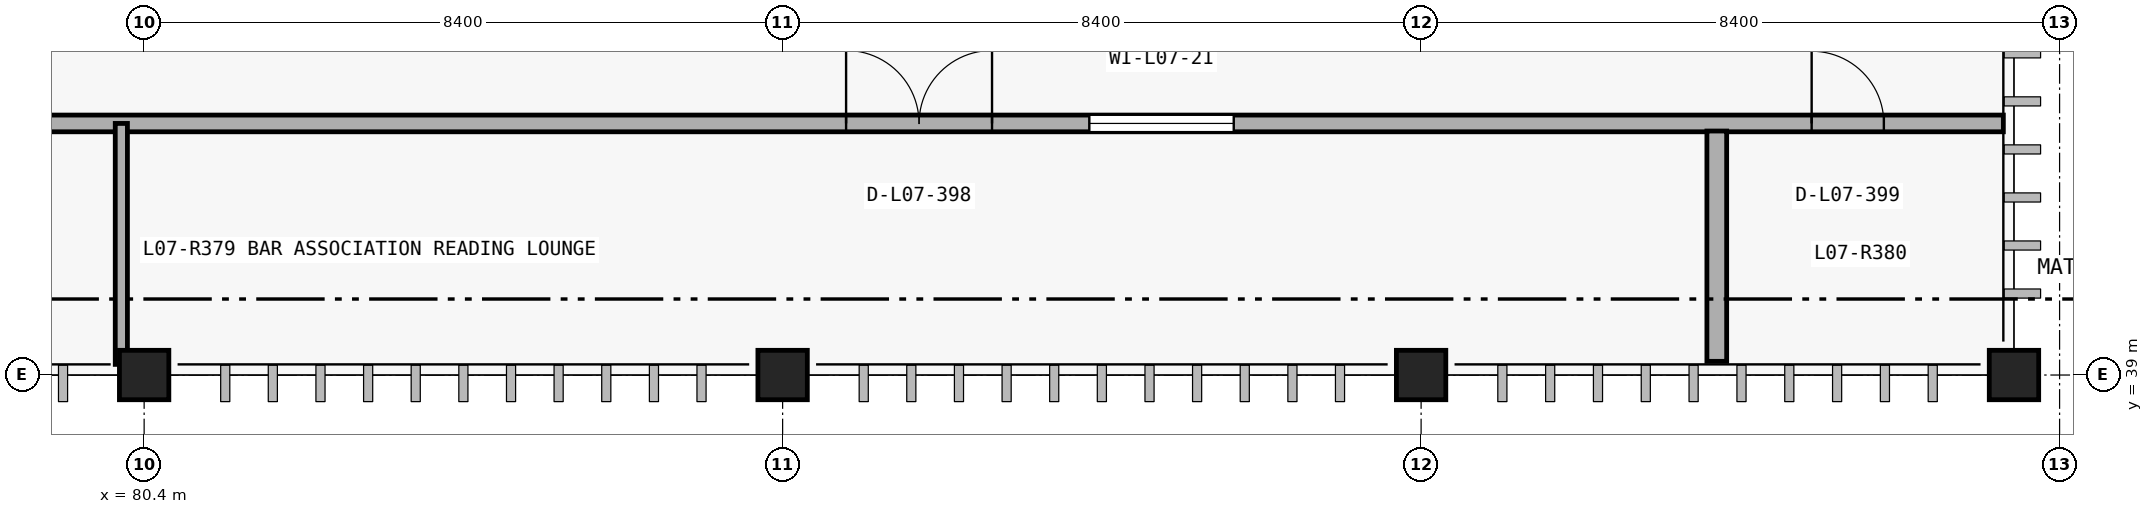
"""IFC4 building model, lengths in metres.
Left out: names, types, materials, properties, quantities, classifications, styles, units other than length and angle.
Written with IfcOpenShell. Run it as: python <this file> out.ifc"""

import sys

from ifc_helpers import new_model, si_unit, direction, frame, frame_2d, origin_with_axes, origin_2d_with_axis, place, context, subcontext, project, spatial, rectangle, circle, extrude, element, fill, save


model = new_model("IFC4")
c1 = context("Model", 3, precision=1e-05, world=origin_with_axes(), true_north=direction((0.0, 1.0)))
c2 = subcontext(c1, "Body", "Model", "MODEL_VIEW")
j1 = project(units=[si_unit("LENGTHUNIT", "METRE"), si_unit("PLANEANGLEUNIT", "RADIAN")], contexts=[c1])
p1 = place(None, origin_with_axes())
s1 = spatial("IfcSite", under=j1, at=p1, CompositionType="ELEMENT")
p2 = place(p1, origin_with_axes())
s2 = spatial("IfcBuilding", under=s1, at=p2, CompositionType="ELEMENT")
p3 = place(p2, frame((0.0, 0.0, 34.5), z_axis=(0.0, 0.0, 1.0), x_axis=(1.0, 0.0, 0.0)))
s3 = spatial("IfcBuildingStorey", under=s2, at=p3, CompositionType="ELEMENT", Elevation=34.5)
p4 = place(None, frame((55.34, 42.31, 34.5), z_axis=(0.0, 0.0, 1.0), x_axis=(1.0, 0.0, 0.0)))
e1 = element("IfcWall", 1, at=p4, inside=s3, PredefinedType="PARTITIONING", context=c2, shape_type="SweptSolid", body=[
    extrude(rectangle(XDim=49.52, YDim=0.22, at=frame_2d((24.76, 0.0), x_axis=(1.0, 0.0))), origin_with_axes(), (0.0, 0.0, 1.0), 4.14),
])
p5 = place(None, frame((67.882, 42.31, 34.5), z_axis=(0.0, 0.0, 1.0), x_axis=(1.0, 0.0, 0.0)))
e2 = element("IfcOpeningElement", 2, at=p5, cuts=e1, PredefinedType="OPENING", context=c2, shape_type="SweptSolid", body=[
    extrude(rectangle(XDim=1.92, YDim=2.64, at=frame_2d((0.0, 1.32), x_axis=(1.0, 0.0))), frame((0.0, 0.12, 0.0), z_axis=(0.0, -1.0, 0.0), x_axis=(1.0, 0.0, 0.0)), (0.0, 0.0, 1.0), 0.24),
])
p6 = place(None, frame((90.595, 42.31, 34.5), z_axis=(0.0, 0.0, 1.0), x_axis=(1.0, 0.0, 0.0)))
e3 = element("IfcOpeningElement", 3, at=p6, cuts=e1, PredefinedType="OPENING", context=c2, shape_type="SweptSolid", body=[
    extrude(rectangle(XDim=1.92, YDim=2.64, at=frame_2d((0.0, 1.32), x_axis=(1.0, 0.0))), frame((0.0, 0.12, 0.0), z_axis=(0.0, -1.0, 0.0), x_axis=(1.0, 0.0, 0.0)), (0.0, 0.0, 1.0), 0.24),
])
p7 = place(None, frame((102.813, 42.31, 34.5), z_axis=(0.0, 0.0, 1.0), x_axis=(1.0, 0.0, 0.0)))
e4 = element("IfcOpeningElement", 4, at=p7, cuts=e1, PredefinedType="OPENING", context=c2, shape_type="SweptSolid", body=[
    extrude(rectangle(XDim=0.95, YDim=2.1, at=frame_2d((0.0, 1.05), x_axis=(1.0, 0.0))), frame((0.0, 0.12, 0.0), z_axis=(0.0, -1.0, 0.0), x_axis=(1.0, 0.0, 0.0)), (0.0, 0.0, 1.0), 0.24),
])
p8 = place(None, frame((70.897, 42.31, 35.55), z_axis=(0.0, 0.0, 1.0), x_axis=(1.0, 0.0, 0.0)))
e5 = element("IfcOpeningElement", 5, at=p8, cuts=e1, PredefinedType="OPENING", context=c2, shape_type="SweptSolid", body=[
    extrude(rectangle(XDim=1.55, YDim=1.35, at=frame_2d((0.0, 0.675), x_axis=(1.0, 0.0))), frame((0.0, 0.12, 0.0), z_axis=(0.0, -1.0, 0.0), x_axis=(1.0, 0.0, 0.0)), (0.0, 0.0, 1.0), 0.24),
])
p9 = place(None, frame((93.785, 42.31, 35.55), z_axis=(0.0, 0.0, 1.0), x_axis=(1.0, 0.0, 0.0)))
e6 = element("IfcOpeningElement", 6, at=p9, cuts=e1, PredefinedType="OPENING", context=c2, shape_type="SweptSolid", body=[
    extrude(rectangle(XDim=1.9, YDim=1.5, at=frame_2d((0.0, 0.75), x_axis=(1.0, 0.0))), frame((0.0, 0.12, 0.0), z_axis=(0.0, -1.0, 0.0), x_axis=(1.0, 0.0, 0.0)), (0.0, 0.0, 1.0), 0.24),
])
p10 = place(None, frame((101.09, 39.18, 34.5), z_axis=(0.0, 0.0, 1.0), x_axis=(0.0, 1.0, 0.0)))
e7 = element("IfcWall", 7, at=p10, inside=s3, PredefinedType="PLUMBINGWALL", context=c2, shape_type="SweptSolid", body=[
    extrude(rectangle(XDim=3.03, YDim=0.26, at=frame_2d((1.515, 0.0), x_axis=(1.0, 0.0))), origin_with_axes(), (0.0, 0.0, 1.0), 4.14),
])
p11 = place(None, frame((80.1, 39.14, 34.5), z_axis=(0.0, 0.0, 1.0), x_axis=(0.0, 1.0, 0.0)))
e8 = element("IfcWall", 8, at=p11, inside=s3, PredefinedType="PARTITIONING", context=c2, shape_type="SweptSolid", body=[
    extrude(rectangle(XDim=3.17, YDim=0.16, at=frame_2d((1.585, 0.0), x_axis=(1.0, 0.0))), origin_with_axes(), (0.0, 0.0, 1.0), 4.14),
])
for number, where, z_axis, x_axis in (
    (9, (80.4, 39.0, 34.5), (0.0, 0.0, 1.0), (1.0, 0.0, 0.0)),
    (10, (88.8, 39.0, 34.5), (0.0, 0.0, 1.0), (1.0, 0.0, 0.0)),
    (11, (97.2, 39.0, 34.5), (0.0, 0.0, 1.0), (1.0, 0.0, 0.0)),
    (12, (105.0, 39.0, 34.5), (0.0, 0.0, 1.0), (1.0, 0.0, 0.0)),
):
    element("IfcColumn", number, at=place(None, frame(where, z_axis=z_axis, x_axis=x_axis)), inside=s3, PredefinedType="COLUMN", context=c2, shape_type="SweptSolid", body=[
        extrude(circle(Radius=0.325, at=origin_2d_with_axis()), origin_with_axes(), (0.0, 0.0, 1.0), 4.5),
    ])
p12 = place(None, frame((90.595, 42.31, 34.5), z_axis=(0.0, 0.0, 1.0), x_axis=(1.0, 0.0, 0.0)))
e13 = element("IfcDoor", 13, at=p12, inside=s3, OperationType="DOUBLE_DOOR_SINGLE_SWING", PredefinedType="DOOR", context=c2, shape_type="SweptSolid", body=[
    extrude(rectangle(XDim=1.92, YDim=2.64, at=frame_2d((0.0, 1.32), x_axis=(1.0, 0.0))), frame((0.0, 0.04, 0.0), z_axis=(0.0, -1.0, 0.0), x_axis=(1.0, 0.0, 0.0)), (0.0, 0.0, 1.0), 0.08),
])
fill(e3, e13)
p13 = place(None, frame((102.813, 42.31, 34.5), z_axis=(0.0, 0.0, 1.0), x_axis=(1.0, 0.0, 0.0)))
e14 = element("IfcDoor", 14, at=p13, inside=s3, OperationType="SINGLE_SWING_LEFT", PredefinedType="DOOR", context=c2, shape_type="SweptSolid", body=[
    extrude(rectangle(XDim=0.95, YDim=2.1, at=frame_2d((0.0, 1.05), x_axis=(1.0, 0.0))), frame((0.0, 0.04, 0.0), z_axis=(0.0, -1.0, 0.0), x_axis=(1.0, 0.0, 0.0)), (0.0, 0.0, 1.0), 0.08),
])
fill(e4, e14)
p14 = place(None, frame((93.785, 42.31, 35.55), z_axis=(0.0, 0.0, 1.0), x_axis=(1.0, 0.0, 0.0)))
e15 = element("IfcWindow", 15, at=p14, inside=s3, PartitioningType="SINGLE_PANEL", PredefinedType="WINDOW", context=c2, shape_type="SweptSolid", body=[
    extrude(rectangle(XDim=1.9, YDim=1.5, at=frame_2d((0.0, 0.75), x_axis=(1.0, 0.0))), frame((0.0, 0.03, 0.0), z_axis=(0.0, -1.0, 0.0), x_axis=(1.0, 0.0, 0.0)), (0.0, 0.0, 1.0), 0.06),
])
fill(e6, e15)
save(model, sys.argv[1])
